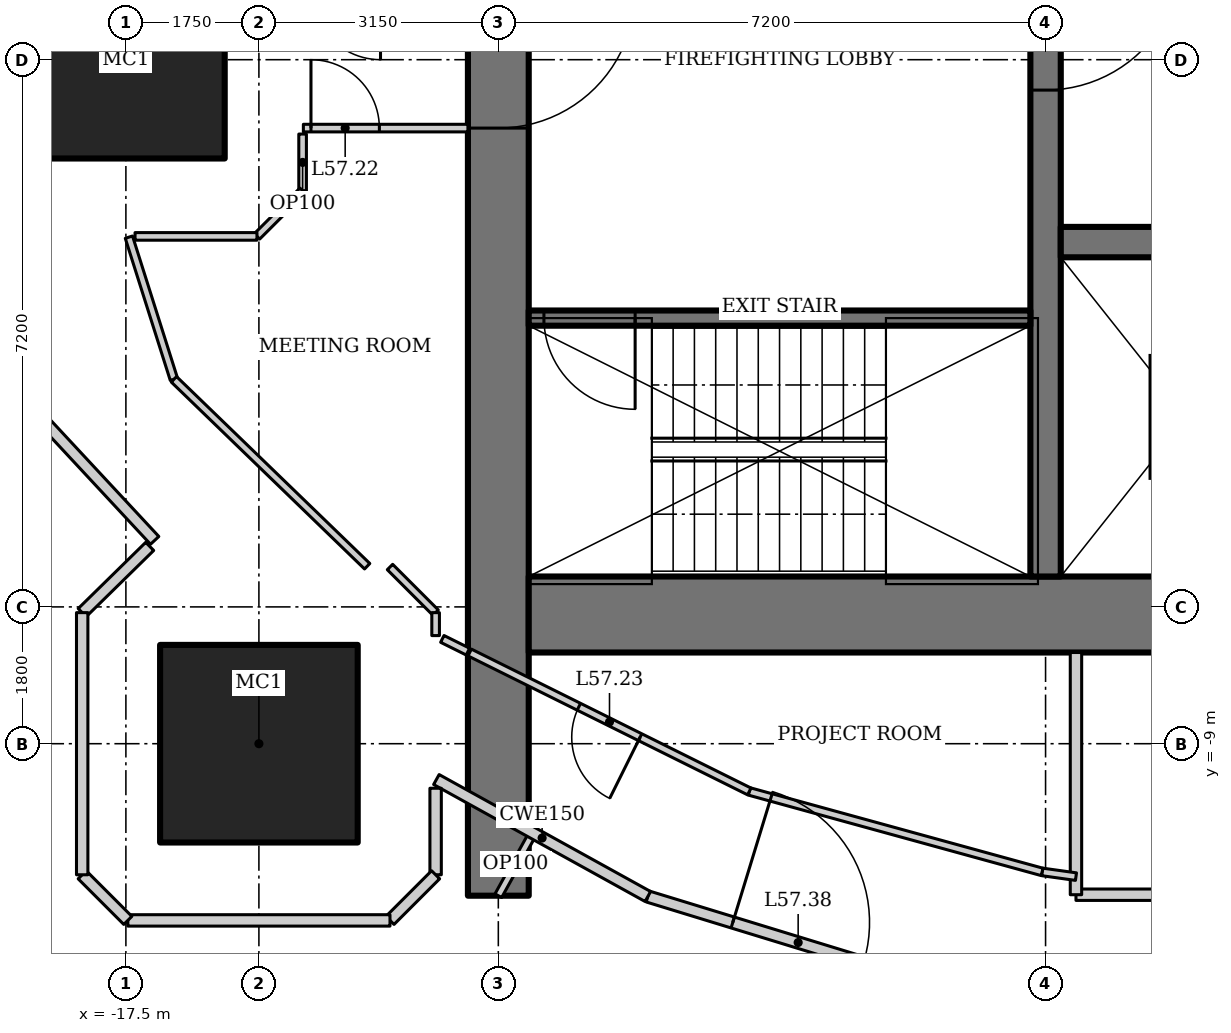
"""IFC4 building model, lengths in metres.
Left out: names, types, materials, properties, quantities, classifications, styles, units other than length and angle.
Written with IfcOpenShell. Run it as: python <this file> out.ifc"""

import sys

from ifc_helpers import new_model, si_unit, direction, frame, frame_2d, origin, origin_2d, place, context, subcontext, project, spatial, rectangle, hollow_rectangle, extrude, element, fill, save


model = new_model("IFC4")
c1 = context("Model", 3, precision=1e-05, world=origin(), true_north=direction((0.0, 1.0)))
c2 = subcontext(c1, "Body", "Model", "MODEL_VIEW")
j1 = project(units=[si_unit("LENGTHUNIT", "METRE"), si_unit("PLANEANGLEUNIT", "RADIAN")], contexts=[c1])
p1 = place(None, origin())
s1 = spatial("IfcSite", under=j1, at=p1, CompositionType="ELEMENT")
p2 = place(p1, origin())
s2 = spatial("IfcBuilding", under=s1, at=p2, CompositionType="ELEMENT")
p3 = place(p2, frame((0.0, 0.0, 245.2)))
s3 = spatial("IfcBuildingStorey", under=s2, at=p3, CompositionType="ELEMENT", Elevation=245.2)
for number, where, z_axis, x_axis in (
    (1, (-17.5, 0.0, 0.0), (0.0, 0.0, 1.0), (1.0, 0.0, 0.0)),
    (2, (-15.75, -9.0, 0.0), (0.0, 0.0, 1.0), (1.0, 0.0, 0.0)),
):
    element("IfcColumn", number, at=place(p3, frame(where, z_axis=z_axis, x_axis=x_axis)), inside=s3, PredefinedType="COLUMN", context=c2, shape_type="SweptSolid", body=[
        extrude(hollow_rectangle(XDim=2.6, YDim=2.6, WallThickness=0.13, at=origin_2d()), origin(), (0.0, 0.0, 1.0), 4.2),
    ])
p4 = place(p3, frame((-12.6, 11.0, 0.0), z_axis=(0.0, 0.0, 1.0), x_axis=(0.0, -1.0, 0.0)))
e3 = element("IfcWall", 3, at=p4, inside=s3, PredefinedType="SHEAR", context=c2, shape_type="SweptSolid", body=[
    extrude(rectangle(XDim=22.0, YDim=0.8, at=frame_2d((11.0, 0.0))), origin(), (0.0, 0.0, 1.0), 4.2),
])
p5 = place(p4, frame((10.1, 0.0, 0.0)))
e4 = element("IfcOpeningElement", 4, at=p5, cuts=e3, PredefinedType="OPENING", context=c2, shape_type="SweptSolid", body=[
    extrude(rectangle(XDim=1.8, YDim=2.1, at=frame_2d((0.9, 1.05))), frame((0.0, 0.41, 0.0), z_axis=(0.0, -1.0, 0.0), x_axis=(1.0, 0.0, 0.0)), (0.0, 0.0, 1.0), 0.82),
])
p6 = place(p3, frame((-12.2, -7.3, 0.0), z_axis=(0.0, 0.0, 1.0), x_axis=(1.0, 0.0, 0.0)))
e5 = element("IfcWall", 5, at=p6, inside=s3, PredefinedType="SHEAR", context=c2, shape_type="SweptSolid", body=[
    extrude(rectangle(XDim=24.4, YDim=1.0, at=frame_2d((12.2, 0.0))), origin(), (0.0, 0.0, 1.0), 4.2),
])
p7 = place(p3, frame((-5.4, 7.8, 0.0), z_axis=(0.0, 0.0, 1.0), x_axis=(0.0, -1.0, 0.0)))
e6 = element("IfcWall", 6, at=p7, inside=s3, PredefinedType="SHEAR", context=c2, shape_type="SweptSolid", body=[
    extrude(rectangle(XDim=14.6, YDim=0.4, at=frame_2d((7.3, 0.0))), origin(), (0.0, 0.0, 1.0), 4.2),
])
p8 = place(p7, frame((6.4, 0.0, 0.0)))
e7 = element("IfcOpeningElement", 7, at=p8, cuts=e6, PredefinedType="OPENING", context=c2, shape_type="SweptSolid", body=[
    extrude(rectangle(XDim=1.8, YDim=2.1, at=frame_2d((0.9, 1.05))), frame((0.0, 0.21, 0.0), z_axis=(0.0, -1.0, 0.0), x_axis=(1.0, 0.0, 0.0)), (0.0, 0.0, 1.0), 0.42),
])
p9 = place(p3, frame((-5.2, -2.4, 0.0), z_axis=(0.0, 0.0, 1.0), x_axis=(1.0, 0.0, 0.0)))
e8 = element("IfcWall", 8, at=p9, inside=s3, PredefinedType="SHEAR", context=c2, shape_type="SweptSolid", body=[
    extrude(rectangle(XDim=10.4, YDim=0.4, at=frame_2d((5.2, 0.0))), origin(), (0.0, 0.0, 1.0), 4.2),
])
p10 = place(p9, frame((1.683, 0.0, 0.0)))
e9 = element("IfcOpeningElement", 9, at=p10, cuts=e8, PredefinedType="OPENING", context=c2, shape_type="SweptSolid", body=[
    extrude(rectangle(XDim=1.1, YDim=2.2, at=frame_2d((0.55, 1.1))), frame((0.0, 0.21, 0.0), z_axis=(0.0, -1.0, 0.0), x_axis=(1.0, 0.0, 0.0)), (0.0, 0.0, 1.0), 0.42),
])
p11 = place(p9, frame((5.217, 0.0, 0.0)))
e10 = element("IfcOpeningElement", 10, at=p11, cuts=e8, PredefinedType="OPENING", context=c2, shape_type="SweptSolid", body=[
    extrude(rectangle(XDim=1.1, YDim=2.2, at=frame_2d((0.55, 1.1))), frame((0.0, 0.21, 0.0), z_axis=(0.0, -1.0, 0.0), x_axis=(1.0, 0.0, 0.0)), (0.0, 0.0, 1.0), 0.42),
])
p12 = place(p9, frame((8.75, 0.0, 0.0)))
e11 = element("IfcOpeningElement", 11, at=p12, cuts=e8, PredefinedType="OPENING", context=c2, shape_type="SweptSolid", body=[
    extrude(rectangle(XDim=1.1, YDim=2.2, at=frame_2d((0.55, 1.1))), frame((0.0, 0.21, 0.0), z_axis=(0.0, -1.0, 0.0), x_axis=(1.0, 0.0, 0.0)), (0.0, 0.0, 1.0), 0.42),
])
p13 = place(p3, frame((-5.6, -3.4, 0.0), z_axis=(0.0, 0.0, 1.0), x_axis=(-1.0, 0.0, 0.0)))
e12 = element("IfcWall", 12, at=p13, inside=s3, PredefinedType="SHEAR", context=c2, shape_type="SweptSolid", body=[
    extrude(rectangle(XDim=6.6, YDim=0.2, at=frame_2d((3.3, 0.0))), origin(), (0.0, 0.0, 1.0), 4.2),
])
p14 = place(p13, frame((5.2, 0.0, 0.0)))
e13 = element("IfcOpeningElement", 13, at=p14, cuts=e12, PredefinedType="OPENING", context=c2, shape_type="SweptSolid", body=[
    extrude(rectangle(XDim=1.2, YDim=2.1, at=frame_2d((0.6, 1.05))), frame((0.0, 0.11, 0.0), z_axis=(0.0, -1.0, 0.0), x_axis=(1.0, 0.0, 0.0)), (0.0, 0.0, 1.0), 0.22),
])
p15 = place(p3, frame((-10.633, -11.01, 0.0), z_axis=(0.0, 0.0, 1.0), x_axis=(0.956185837153, -0.292760388079, 0.0)))
e14 = element("IfcWall", 14, at=p15, inside=s3, PredefinedType="PARTITIONING", context=c2, shape_type="SweptSolid", body=[
    extrude(rectangle(XDim=4.544, YDim=0.15, at=frame_2d((2.272, 0.0))), origin(), (0.0, 0.0, 1.0), 4.05),
])
p16 = place(p15, frame((1.168, 0.0, 0.0)))
e15 = element("IfcOpeningElement", 15, at=p16, cuts=e14, PredefinedType="OPENING", context=c2, shape_type="SweptSolid", body=[
    extrude(rectangle(XDim=1.8, YDim=2.1, at=frame_2d((0.9, 1.05))), frame((0.0, 0.085, 0.0), z_axis=(0.0, -1.0, 0.0), x_axis=(1.0, 0.0, 0.0)), (0.0, 0.0, 1.0), 0.17),
])
p17 = place(p3, frame((-5.0, -10.987, 0.0), z_axis=(0.0, 0.0, 1.0), x_axis=(1.0, 0.0, 0.0)))
e16 = element("IfcWall", 16, at=p17, inside=s3, PredefinedType="SOLIDWALL", context=c2, shape_type="SweptSolid", body=[
    extrude(rectangle(XDim=10.0, YDim=0.15, at=frame_2d((5.0, 0.0))), origin(), (0.0, 0.0, 1.0), 4.05),
])
p18 = place(p17, frame((1.25, 0.0, 0.0)))
e17 = element("IfcOpeningElement", 17, at=p18, cuts=e16, PredefinedType="OPENING", context=c2, shape_type="SweptSolid", body=[
    extrude(rectangle(XDim=0.9, YDim=2.1, at=frame_2d((0.45, 1.05))), frame((0.0, 0.085, 0.0), z_axis=(0.0, -1.0, 0.0), x_axis=(1.0, 0.0, 0.0)), (0.0, 0.0, 1.0), 0.17),
])
p19 = place(p17, frame((4.65, 0.0, 0.0)))
e18 = element("IfcOpeningElement", 18, at=p19, cuts=e16, PredefinedType="OPENING", context=c2, shape_type="SweptSolid", body=[
    extrude(rectangle(XDim=0.9, YDim=2.1, at=frame_2d((0.45, 1.05))), frame((0.0, 0.085, 0.0), z_axis=(0.0, -1.0, 0.0), x_axis=(1.0, 0.0, 0.0)), (0.0, 0.0, 1.0), 0.17),
])
p20 = place(p17, frame((7.25, 0.0, 0.0)))
e19 = element("IfcOpeningElement", 19, at=p20, cuts=e16, PredefinedType="OPENING", context=c2, shape_type="SweptSolid", body=[
    extrude(rectangle(XDim=1.0, YDim=2.1, at=frame_2d((0.5, 1.05))), frame((0.0, 0.085, 0.0), z_axis=(0.0, -1.0, 0.0), x_axis=(1.0, 0.0, 0.0)), (0.0, 0.0, 1.0), 0.17),
])
p21 = place(p17, frame((8.95, 0.0, 0.0)))
e20 = element("IfcOpeningElement", 20, at=p21, cuts=e16, PredefinedType="OPENING", context=c2, shape_type="SweptSolid", body=[
    extrude(rectangle(XDim=0.8, YDim=2.1, at=frame_2d((0.4, 1.05))), frame((0.0, 0.085, 0.0), z_axis=(0.0, -1.0, 0.0), x_axis=(1.0, 0.0, 0.0)), (0.0, 0.0, 1.0), 0.17),
])
p22 = place(p3, frame((-5.0, -7.8, 0.0), z_axis=(0.0, 0.0, 1.0), x_axis=(0.0, -1.0, 0.0)))
e21 = element("IfcWall", 21, at=p22, inside=s3, PredefinedType="SOLIDWALL", context=c2, shape_type="SweptSolid", body=[
    extrude(rectangle(XDim=3.187, YDim=0.15, at=frame_2d((1.594, 0.0))), origin(), (0.0, 0.0, 1.0), 4.05),
])
p23 = place(p3, frame((-13.0, -7.788, 0.0), z_axis=(0.0, 0.0, 1.0), x_axis=(-0.895721570004, 0.444615416995, 0.0)))
e22 = element("IfcWall", 22, at=p23, inside=s3, PredefinedType="PARTITIONING", context=c2, shape_type="SweptSolid", body=[
    extrude(rectangle(XDim=0.376, YDim=0.1, at=frame_2d((0.188, 0.0))), origin(), (0.0, 0.0, 1.0), 4.05),
])
p24 = place(p3, frame((-5.0, -10.749, 0.0), z_axis=(0.0, 0.0, 1.0), x_axis=(-0.990442882696, 0.137923515463, 0.0)))
e23 = element("IfcWall", 23, at=p24, inside=s3, PredefinedType="PARTITIONING", context=c2, shape_type="SweptSolid", body=[
    extrude(rectangle(XDim=0.45, YDim=0.1, at=frame_2d((0.225, 0.0))), origin(), (0.0, 0.0, 1.0), 4.05),
])
p25 = place(p3, frame((-5.445, -10.687, 0.0), z_axis=(0.0, 0.0, 1.0), x_axis=(-0.964244438722, 0.265014456954, 0.0)))
e24 = element("IfcWall", 24, at=p25, inside=s3, PredefinedType="PARTITIONING", context=c2, shape_type="SweptSolid", body=[
    extrude(rectangle(XDim=3.995, YDim=0.1, at=frame_2d((1.998, 0.0))), origin(), (0.0, 0.0, 1.0), 4.05),
])
p26 = place(p3, frame((-9.298, -9.628, 0.0), z_axis=(0.0, 0.0, 1.0), x_axis=(-0.895529831139, 0.445001484874, 0.0)))
e25 = element("IfcWall", 25, at=p26, inside=s3, PredefinedType="PARTITIONING", context=c2, shape_type="SweptSolid", body=[
    extrude(rectangle(XDim=4.108, YDim=0.1, at=frame_2d((2.054, 0.0))), origin(), (0.0, 0.0, 1.0), 4.05),
])
p27 = place(p26, frame((1.604, 0.0, 0.0)))
e26 = element("IfcOpeningElement", 26, at=p27, cuts=e25, PredefinedType="OPENING", context=c2, shape_type="SweptSolid", body=[
    extrude(rectangle(XDim=0.9, YDim=2.1, at=frame_2d((0.45, 1.05))), frame((0.0, 0.06, 0.0), z_axis=(0.0, -1.0, 0.0), x_axis=(1.0, 0.0, 0.0)), (0.0, 0.0, 1.0), 0.12),
])
p28 = place(p3, frame((-12.6, -11.0, 0.0), z_axis=(0.0, 0.0, 1.0), x_axis=(0.484103558985, 0.875010710893, 0.0)))
e27 = element("IfcWall", 27, at=p28, inside=s3, PredefinedType="PARTITIONING", context=c2, shape_type="SweptSolid", body=[
    extrude(rectangle(XDim=0.943, YDim=0.1, at=frame_2d((0.472, 0.0))), origin(), (0.0, 0.0, 1.0), 4.05),
])
p29 = place(p3, frame((-16.868, -4.206, 0.0), z_axis=(0.0, 0.0, 1.0), x_axis=(-0.301821975729, 0.953364303384, 0.0)))
e28 = element("IfcWall", 28, at=p29, inside=s3, PredefinedType="PARTITIONING", context=c2, shape_type="SweptSolid", body=[
    extrude(rectangle(XDim=1.962, YDim=0.1, at=frame_2d((0.981, 0.0))), origin(), (0.0, 0.0, 1.0), 4.05),
])
p30 = place(p3, frame((-15.165, -0.9, 0.0), z_axis=(0.0, 0.0, 1.0), x_axis=(1.0, 0.0, 0.0)))
e29 = element("IfcWall", 29, at=p30, inside=s3, PredefinedType="PARTITIONING", context=c2, shape_type="SweptSolid", body=[
    extrude(rectangle(XDim=2.165, YDim=0.1, at=frame_2d((1.083, 0.0))), origin(), (0.0, 0.0, 1.0), 4.05),
])
p31 = place(p30, frame((0.1, 0.0, 0.0)))
e30 = element("IfcOpeningElement", 30, at=p31, cuts=e29, PredefinedType="OPENING", context=c2, shape_type="SweptSolid", body=[
    extrude(rectangle(XDim=0.9, YDim=2.1, at=frame_2d((0.45, 1.05))), frame((0.0, 0.06, 0.0), z_axis=(0.0, -1.0, 0.0), x_axis=(1.0, 0.0, 0.0)), (0.0, 0.0, 1.0), 0.12),
])
p32 = place(p3, frame((-15.175, -0.978, 0.0), z_axis=(0.0, 0.0, 1.0), x_axis=(0.0, -1.0, 0.0)))
e31 = element("IfcWall", 31, at=p32, inside=s3, PredefinedType="PARTITIONING", context=c2, shape_type="SweptSolid", body=[
    extrude(rectangle(XDim=0.746, YDim=0.1, at=frame_2d((0.373, 0.0))), origin(), (0.0, 0.0, 1.0), 4.05),
])
p33 = place(p3, frame((-15.175, -1.725, 0.0), z_axis=(0.0, 0.0, 1.0), x_axis=(-0.707106781187, -0.707106781187, 0.0)))
e32 = element("IfcWall", 32, at=p33, inside=s3, PredefinedType="PARTITIONING", context=c2, shape_type="SweptSolid", body=[
    extrude(rectangle(XDim=0.849, YDim=0.1, at=frame_2d((0.425, 0.0))), origin(), (0.0, 0.0, 1.0), 4.05),
])
p34 = place(p3, frame((-15.775, -2.325, 0.0), z_axis=(0.0, 0.0, 1.0), x_axis=(-1.0, 0.0, 0.0)))
e33 = element("IfcWall", 33, at=p34, inside=s3, PredefinedType="PARTITIONING", context=c2, shape_type="SweptSolid", body=[
    extrude(rectangle(XDim=1.604, YDim=0.1, at=frame_2d((0.802, 0.0))), origin(), (0.0, 0.0, 1.0), 4.05),
])
p35 = place(p3, frame((-18.673, -4.656, 0.0), z_axis=(0.0, 0.0, 1.0), x_axis=(0.680985069419, -0.732297299755, 0.0)))
e34 = element("IfcWall", 34, at=p35, inside=s3, PredefinedType="PARTITIONING", context=c2, shape_type="SweptSolid", body=[
    extrude(rectangle(XDim=2.279, YDim=0.15, at=frame_2d((1.14, 0.0))), origin(), (0.0, 0.0, 1.0), 4.05),
])
p36 = place(p3, frame((-13.415, -9.472, 0.0), z_axis=(0.0, 0.0, 1.0), x_axis=(0.875072100837, -0.483992580869, 0.0)))
e35 = element("IfcWall", 35, at=p36, inside=s3, PredefinedType="PARTITIONING", context=c2, shape_type="SweptSolid", body=[
    extrude(rectangle(XDim=3.179, YDim=0.15, at=frame_2d((1.59, 0.0))), origin(), (0.0, 0.0, 1.0), 4.05),
])
p37 = place(p3, frame((-14.325, -6.665, 0.0), z_axis=(0.0, 0.0, 1.0), x_axis=(-0.718810161381, 0.695206409562, 0.0)))
e36 = element("IfcWall", 36, at=p37, inside=s3, PredefinedType="PARTITIONING", context=c2, shape_type="SweptSolid", body=[
    extrude(rectangle(XDim=3.537, YDim=0.1, at=frame_2d((1.769, 0.0))), origin(), (0.0, 0.0, 1.0), 4.05),
])
p38 = place(p3, frame((-14.025, -6.675, 0.0), z_axis=(0.0, 0.0, 1.0), x_axis=(0.707106781187, -0.707106781187, 0.0)))
e37 = element("IfcWall", 37, at=p38, inside=s3, PredefinedType="PARTITIONING", context=c2, shape_type="SweptSolid", body=[
    extrude(rectangle(XDim=0.849, YDim=0.1, at=frame_2d((0.425, 0.0))), origin(), (0.0, 0.0, 1.0), 4.05),
])
p39 = place(p3, frame((-13.425, -7.275, 0.0), z_axis=(0.0, 0.0, 1.0), x_axis=(0.0, -1.0, 0.0)))
e38 = element("IfcWall", 38, at=p39, inside=s3, PredefinedType="PARTITIONING", context=c2, shape_type="SweptSolid", body=[
    extrude(rectangle(XDim=0.302, YDim=0.1, at=frame_2d((0.151, 0.0))), origin(), (0.0, 0.0, 1.0), 4.05),
])
p40 = place(p3, frame((-18.075, -7.275, 0.0), z_axis=(0.0, 0.0, 1.0), x_axis=(0.713842064016, 0.700306723973, 0.0)))
e39 = element("IfcWall", 39, at=p40, inside=s3, PredefinedType="PARTITIONING", context=c2, shape_type="SweptSolid", body=[
    extrude(rectangle(XDim=1.245, YDim=0.15, at=frame_2d((0.622, 0.0))), origin(), (0.0, 0.0, 1.0), 4.05),
])
p41 = place(p3, frame((-13.425, -9.586, 0.0), z_axis=(0.0, 0.0, 1.0), x_axis=(0.0, -1.0, 0.0)))
e40 = element("IfcWall", 40, at=p41, inside=s3, PredefinedType="PARTITIONING", context=c2, shape_type="SweptSolid", body=[
    extrude(rectangle(XDim=1.138, YDim=0.15, at=frame_2d((0.569, 0.0))), origin(), (0.0, 0.0, 1.0), 4.05),
])
p42 = place(p3, frame((-13.425, -10.725, 0.0), z_axis=(0.0, 0.0, 1.0), x_axis=(-0.707106781187, -0.707106781187, 0.0)))
e41 = element("IfcWall", 41, at=p42, inside=s3, PredefinedType="PARTITIONING", context=c2, shape_type="SweptSolid", body=[
    extrude(rectangle(XDim=0.849, YDim=0.15, at=frame_2d((0.425, 0.0))), origin(), (0.0, 0.0, 1.0), 4.05),
])
p43 = place(p3, frame((-14.025, -11.325, 0.0), z_axis=(0.0, 0.0, 1.0), x_axis=(-1.0, 0.0, 0.0)))
e42 = element("IfcWall", 42, at=p43, inside=s3, PredefinedType="PARTITIONING", context=c2, shape_type="SweptSolid", body=[
    extrude(rectangle(XDim=3.449, YDim=0.15, at=frame_2d((1.725, 0.0))), origin(), (0.0, 0.0, 1.0), 4.05),
])
p44 = place(p3, frame((-17.475, -11.325, 0.0), z_axis=(0.0, 0.0, 1.0), x_axis=(-0.707106781187, 0.707106781187, 0.0)))
e43 = element("IfcWall", 43, at=p44, inside=s3, PredefinedType="PARTITIONING", context=c2, shape_type="SweptSolid", body=[
    extrude(rectangle(XDim=0.849, YDim=0.15, at=frame_2d((0.425, 0.0))), origin(), (0.0, 0.0, 1.0), 4.05),
])
p45 = place(p3, frame((-18.075, -10.725, 0.0), z_axis=(0.0, 0.0, 1.0), x_axis=(0.0, 1.0, 0.0)))
e44 = element("IfcWall", 44, at=p45, inside=s3, PredefinedType="PARTITIONING", context=c2, shape_type="SweptSolid", body=[
    extrude(rectangle(XDim=3.449, YDim=0.15, at=frame_2d((1.725, 0.0))), origin(), (0.0, 0.0, 1.0), 3.601),
])
p46 = place(p8, origin())
e45 = element("IfcDoor", 45, at=p46, inside=s3, OperationType="DOUBLE_DOOR_DOUBLE_SWING", PredefinedType="DOOR", context=c2, shape_type="SweptSolid", body=[
    extrude(rectangle(XDim=1.8, YDim=2.1, at=frame_2d((0.9, 1.05))), frame((0.0, 0.025, 0.0), z_axis=(0.0, -1.0, 0.0), x_axis=(1.0, 0.0, 0.0)), (0.0, 0.0, 1.0), 0.05),
])
fill(e7, e45)
p47 = place(p14, origin())
e46 = element("IfcDoor", 46, at=p47, inside=s3, OperationType="SINGLE_SWING_RIGHT", PredefinedType="DOOR", context=c2, shape_type="SweptSolid", body=[
    extrude(rectangle(XDim=1.2, YDim=2.1, at=frame_2d((0.6, 1.05))), frame((0.0, 0.025, 0.0), z_axis=(0.0, -1.0, 0.0), x_axis=(1.0, 0.0, 0.0)), (0.0, 0.0, 1.0), 0.05),
])
fill(e13, e46)
p48 = place(p5, origin())
e47 = element("IfcDoor", 47, at=p48, inside=s3, OperationType="DOUBLE_DOOR_DOUBLE_SWING", PredefinedType="DOOR", context=c2, shape_type="SweptSolid", body=[
    extrude(rectangle(XDim=1.8, YDim=2.1, at=frame_2d((0.9, 1.05))), frame((0.0, 0.025, 0.0), z_axis=(0.0, -1.0, 0.0), x_axis=(1.0, 0.0, 0.0)), (0.0, 0.0, 1.0), 0.05),
])
fill(e4, e47)
p49 = place(p31, origin())
e48 = element("IfcDoor", 48, at=p49, inside=s3, OperationType="SINGLE_SWING_LEFT", PredefinedType="DOOR", context=c2, shape_type="SweptSolid", body=[
    extrude(rectangle(XDim=0.9, YDim=2.1, at=frame_2d((0.45, 1.05))), frame((0.0, 0.025, 0.0), z_axis=(0.0, -1.0, 0.0), x_axis=(1.0, 0.0, 0.0)), (0.0, 0.0, 1.0), 0.05),
])
fill(e30, e48)
p50 = place(p27, origin())
e49 = element("IfcDoor", 49, at=p50, inside=s3, OperationType="SINGLE_SWING_LEFT", PredefinedType="DOOR", context=c2, shape_type="SweptSolid", body=[
    extrude(rectangle(XDim=0.9, YDim=2.1, at=frame_2d((0.45, 1.05))), frame((0.0, 0.025, 0.0), z_axis=(0.0, -1.0, 0.0), x_axis=(1.0, 0.0, 0.0)), (0.0, 0.0, 1.0), 0.05),
])
fill(e26, e49)
p51 = place(p16, origin())
e50 = element("IfcDoor", 50, at=p51, inside=s3, OperationType="DOUBLE_DOOR_DOUBLE_SWING", PredefinedType="DOOR", context=c2, shape_type="SweptSolid", body=[
    extrude(rectangle(XDim=1.8, YDim=2.1, at=frame_2d((0.9, 1.05))), frame((0.0, 0.025, 0.0), z_axis=(0.0, -1.0, 0.0), x_axis=(1.0, 0.0, 0.0)), (0.0, 0.0, 1.0), 0.05),
])
fill(e15, e50)
save(model, sys.argv[1])
